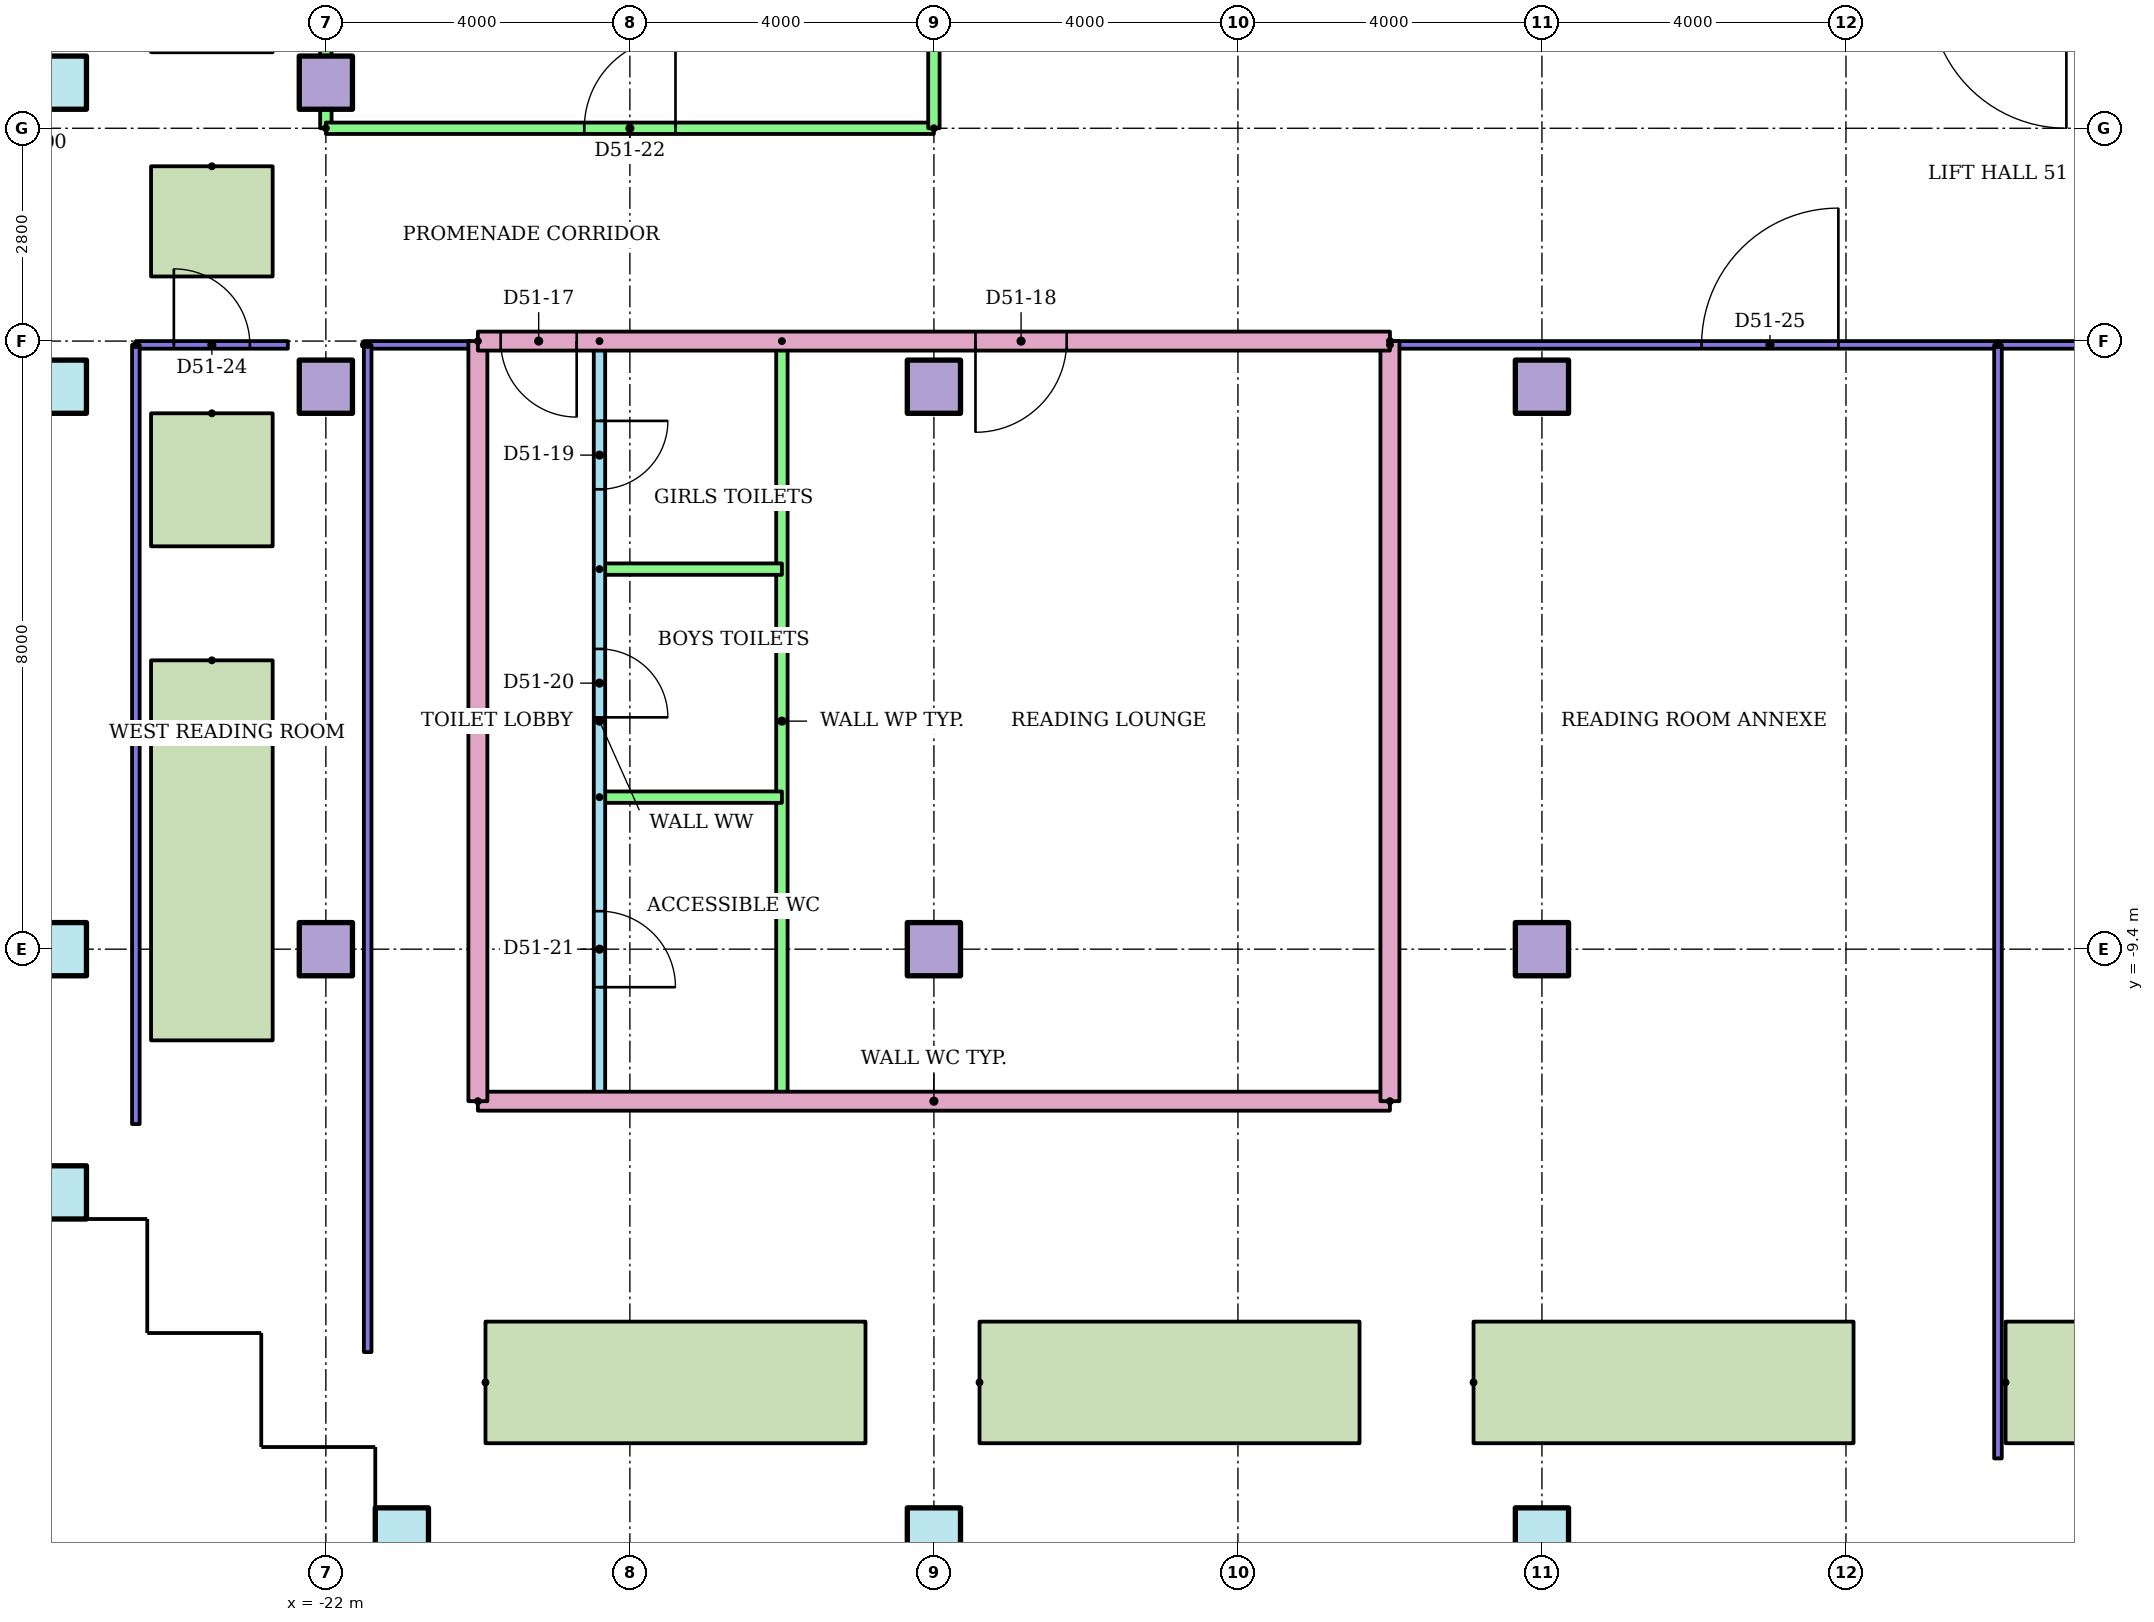
"""IFC4 building model, lengths in metres.
Left out: names, types, materials, properties, quantities, classifications, styles, units other than length and angle.
Written with IfcOpenShell. Run it as: python <this file> out.ifc"""

import sys

from ifc_helpers import new_model, si_unit, direction, frame, frame_2d, origin, origin_2d, place, context, subcontext, project, spatial, rectangle, hollow_rectangle, extrude, element, fill, save


model = new_model("IFC4")
c1 = context("Model", 3, precision=1e-05, world=origin(), true_north=direction((0.0, 1.0)))
c2 = subcontext(c1, "Body", "Model", "MODEL_VIEW")
j1 = project(units=[si_unit("LENGTHUNIT", "METRE"), si_unit("PLANEANGLEUNIT", "RADIAN")], contexts=[c1])
p1 = place(None, origin())
s1 = spatial("IfcSite", under=j1, at=p1, CompositionType="ELEMENT")
p2 = place(p1, origin())
s2 = spatial("IfcBuilding", under=s1, at=p2, CompositionType="ELEMENT")
p3 = place(p2, frame((0.0, 0.0, 194.1)))
s3 = spatial("IfcBuildingStorey", under=s2, at=p3, CompositionType="ELEMENT", Elevation=194.1)
p4 = place(p3, frame((-21.0, -17.1, 0.0)))
e1 = element("IfcColumn", 1, at=p4, inside=s3, PredefinedType="COLUMN", context=c2, shape_type="SweptSolid", body=[
    extrude(hollow_rectangle(XDim=0.7, YDim=0.7, WallThickness=0.036, at=origin_2d()), origin(), (0.0, 0.0, 1.0), 8.8),
])
for number, where in (
    (2, (-14.0, -17.1, 0.0)),
    (3, (-6.0, -17.1, 0.0)),
):
    element("IfcColumn", number, at=place(p3, frame(where)), inside=s3, PredefinedType="COLUMN", context=c2, shape_type="SweptSolid", body=[
        extrude(hollow_rectangle(XDim=0.7, YDim=0.7, WallThickness=0.036, at=origin_2d()), origin(), (0.0, 0.0, 1.0), 9.6),
    ])
for number, where in (
    (4, (-25.5, -12.6, 0.0)),
    (5, (-25.5, -9.4, 0.0)),
):
    element("IfcColumn", number, at=place(p3, frame(where)), inside=s3, PredefinedType="COLUMN", context=c2, shape_type="SweptSolid", body=[
        extrude(hollow_rectangle(XDim=0.7, YDim=0.7, WallThickness=0.036, at=origin_2d()), origin(), (0.0, 0.0, 1.0), 8.8),
    ])
for number, where in (
    (6, (-22.0, -9.4, 0.0)),
    (7, (-14.0, -9.4, 0.0)),
    (8, (-6.0, -9.4, 0.0)),
):
    element("IfcColumn", number, at=place(p3, frame(where)), inside=s3, PredefinedType="COLUMN", context=c2, shape_type="SweptSolid", body=[
        extrude(rectangle(XDim=0.7, YDim=0.7, at=origin_2d()), origin(), (0.0, 0.0, 1.0), 9.6),
    ])
p5 = place(p3, frame((-25.5, -2.0, 0.0)))
e9 = element("IfcColumn", 9, at=p5, inside=s3, PredefinedType="COLUMN", context=c2, shape_type="SweptSolid", body=[
    extrude(hollow_rectangle(XDim=0.7, YDim=0.7, WallThickness=0.036, at=origin_2d()), origin(), (0.0, 0.0, 1.0), 8.8),
])
for number, where in (
    (10, (-22.0, -2.0, 0.0)),
    (11, (-14.0, -2.0, 0.0)),
    (12, (-6.0, -2.0, 0.0)),
):
    element("IfcColumn", number, at=place(p3, frame(where)), inside=s3, PredefinedType="COLUMN", context=c2, shape_type="SweptSolid", body=[
        extrude(rectangle(XDim=0.7, YDim=0.7, at=origin_2d()), origin(), (0.0, 0.0, 1.0), 9.6),
    ])
p6 = place(p3, frame((-25.5, 2.0, 0.0)))
e13 = element("IfcColumn", 13, at=p6, inside=s3, PredefinedType="COLUMN", context=c2, shape_type="SweptSolid", body=[
    extrude(hollow_rectangle(XDim=0.7, YDim=0.7, WallThickness=0.036, at=origin_2d()), origin(), (0.0, 0.0, 1.0), 8.8),
])
p7 = place(p3, frame((-22.0, 2.0, 0.0)))
e14 = element("IfcColumn", 14, at=p7, inside=s3, PredefinedType="COLUMN", context=c2, shape_type="SweptSolid", body=[
    extrude(rectangle(XDim=0.7, YDim=0.7, at=origin_2d()), origin(), (0.0, 0.0, 1.0), 9.6),
])
p8 = place(p3, frame((-23.5, -5.6, 0.0), z_axis=(0.0, 0.0, 1.0), x_axis=(0.0, -1.0, 0.0)))
e15 = element("IfcWall", 15, at=p8, inside=s3, PredefinedType="STANDARD", context=c2, shape_type="SweptSolid", body=[
    extrude(rectangle(XDim=5.0, YDim=1.6, at=frame_2d((2.5, 0.0))), origin(), (0.0, 0.0, 1.0), 0.8),
])
for number, where in (
    (16, (-19.9, -15.1, 0.0)),
    (17, (-13.4, -15.1, 0.0)),
    (18, (-6.9, -15.1, 0.0)),
):
    element("IfcWall", number, at=place(p3, frame(where)), inside=s3, PredefinedType="STANDARD", context=c2, shape_type="SweptSolid", body=[
        extrude(rectangle(XDim=5.0, YDim=1.6, at=frame_2d((2.5, 0.0))), origin(), (0.0, 0.0, 1.0), 0.8),
    ])
p9 = place(p3, frame((-20.0, -11.4, 0.0)))
e19 = element("IfcWall", 19, at=p9, inside=s3, PredefinedType="PARTITIONING", context=c2, shape_type="SweptSolid", body=[
    extrude(rectangle(XDim=12.0, YDim=0.25, at=frame_2d((6.0, 0.0))), origin(), (0.0, 0.0, 1.0), 8.8),
])
for number, where, z_axis, x_axis in (
    (20, (-20.0, -1.4, 0.0), (0.0, 0.0, 1.0), (0.0, -1.0, 0.0)),
    (21, (-8.0, -11.4, 0.0), (0.0, 0.0, 1.0), (0.0, 1.0, 0.0)),
):
    element("IfcWall", number, at=place(p3, frame(where, z_axis=z_axis, x_axis=x_axis)), inside=s3, PredefinedType="PARTITIONING", context=c2, shape_type="SweptSolid", body=[
        extrude(rectangle(XDim=10.0, YDim=0.25, at=frame_2d((5.0, 0.0))), origin(), (0.0, 0.0, 1.0), 8.8),
    ])
p10 = place(p3, frame((-8.0, -1.4, 0.0), z_axis=(0.0, 0.0, 1.0), x_axis=(-1.0, 0.0, 0.0)))
e22 = element("IfcWall", 22, at=p10, inside=s3, PredefinedType="PARTITIONING", context=c2, shape_type="SweptSolid", body=[
    extrude(rectangle(XDim=12.0, YDim=0.25, at=frame_2d((6.0, 0.0))), origin(), (0.0, 0.0, 1.0), 8.8),
])
p11 = place(p10, frame((10.7, 0.0, 0.0)))
e23 = element("IfcOpeningElement", 23, at=p11, cuts=e22, PredefinedType="OPENING", context=c2, shape_type="SweptSolid", body=[
    extrude(rectangle(XDim=1.0, YDim=2.1, at=frame_2d((0.5, 1.05))), frame((0.0, 0.135, 0.0), z_axis=(0.0, -1.0, 0.0), x_axis=(1.0, 0.0, 0.0)), (0.0, 0.0, 1.0), 0.27),
])
p12 = place(p10, frame((4.253, 0.0, 0.0)))
e24 = element("IfcOpeningElement", 24, at=p12, cuts=e22, PredefinedType="OPENING", context=c2, shape_type="SweptSolid", body=[
    extrude(rectangle(XDim=1.2, YDim=2.1, at=frame_2d((0.6, 1.05))), frame((0.0, 0.135, 0.0), z_axis=(0.0, -1.0, 0.0), x_axis=(1.0, 0.0, 0.0)), (0.0, 0.0, 1.0), 0.27),
])
p13 = place(p3, frame((-18.4, -1.4, 0.0), z_axis=(0.0, 0.0, 1.0), x_axis=(0.0, -1.0, 0.0)))
e25 = element("IfcWall", 25, at=p13, inside=s3, PredefinedType="PARTITIONING", context=c2, shape_type="SweptSolid", body=[
    extrude(rectangle(XDim=10.0, YDim=0.15, at=frame_2d((5.0, 0.0))), origin(), (0.0, 0.0, 1.0), 8.8),
])
p14 = place(p13, frame((1.05, 0.0, 0.0)))
e26 = element("IfcOpeningElement", 26, at=p14, cuts=e25, PredefinedType="OPENING", context=c2, shape_type="SweptSolid", body=[
    extrude(rectangle(XDim=0.9, YDim=2.1, at=frame_2d((0.45, 1.05))), frame((0.0, 0.085, 0.0), z_axis=(0.0, -1.0, 0.0), x_axis=(1.0, 0.0, 0.0)), (0.0, 0.0, 1.0), 0.17),
])
p15 = place(p13, frame((4.05, 0.0, 0.0)))
e27 = element("IfcOpeningElement", 27, at=p15, cuts=e25, PredefinedType="OPENING", context=c2, shape_type="SweptSolid", body=[
    extrude(rectangle(XDim=0.9, YDim=2.1, at=frame_2d((0.45, 1.05))), frame((0.0, 0.085, 0.0), z_axis=(0.0, -1.0, 0.0), x_axis=(1.0, 0.0, 0.0)), (0.0, 0.0, 1.0), 0.17),
])
p16 = place(p13, frame((7.5, 0.0, 0.0)))
e28 = element("IfcOpeningElement", 28, at=p16, cuts=e25, PredefinedType="OPENING", context=c2, shape_type="SweptSolid", body=[
    extrude(rectangle(XDim=1.0, YDim=2.1, at=frame_2d((0.5, 1.05))), frame((0.0, 0.085, 0.0), z_axis=(0.0, -1.0, 0.0), x_axis=(1.0, 0.0, 0.0)), (0.0, 0.0, 1.0), 0.17),
])
p17 = place(p3, frame((-16.0, -1.4, 0.0), z_axis=(0.0, 0.0, 1.0), x_axis=(0.0, -1.0, 0.0)))
e29 = element("IfcWall", 29, at=p17, inside=s3, PredefinedType="PARTITIONING", context=c2, shape_type="SweptSolid", body=[
    extrude(rectangle(XDim=10.0, YDim=0.15, at=frame_2d((5.0, 0.0))), origin(), (0.0, 0.0, 1.0), 8.8),
])
for number, where in (
    (30, (-18.4, -4.4, 0.0)),
    (31, (-18.4, -7.4, 0.0)),
):
    element("IfcWall", number, at=place(p3, frame(where)), inside=s3, PredefinedType="PARTITIONING", context=c2, shape_type="SweptSolid", body=[
        extrude(rectangle(XDim=2.4, YDim=0.15, at=frame_2d((1.2, 0.0))), origin(), (0.0, 0.0, 1.0), 8.8),
    ])
p18 = place(p3, frame((-22.0, 10.4, 0.0), z_axis=(0.0, 0.0, 1.0), x_axis=(0.0, -1.0, 0.0)))
e32 = element("IfcWall", 32, at=p18, inside=s3, PredefinedType="PARTITIONING", context=c2, shape_type="SweptSolid", body=[
    extrude(rectangle(XDim=9.0, YDim=0.15, at=frame_2d((4.5, 0.0))), origin(), (0.0, 0.0, 1.0), 8.8),
])
p19 = place(p3, frame((-22.0, 1.4, 0.0)))
e33 = element("IfcWall", 33, at=p19, inside=s3, PredefinedType="PARTITIONING", context=c2, shape_type="SweptSolid", body=[
    extrude(rectangle(XDim=8.0, YDim=0.15, at=frame_2d((4.0, 0.0))), origin(), (0.0, 0.0, 1.0), 8.8),
])
p20 = place(p19, frame((3.4, 0.0, 0.0)))
e34 = element("IfcOpeningElement", 34, at=p20, cuts=e33, PredefinedType="OPENING", context=c2, shape_type="SweptSolid", body=[
    extrude(rectangle(XDim=1.2, YDim=2.1, at=frame_2d((0.6, 1.05))), frame((0.0, 0.085, 0.0), z_axis=(0.0, -1.0, 0.0), x_axis=(1.0, 0.0, 0.0)), (0.0, 0.0, 1.0), 0.17),
])
p21 = place(p3, frame((-14.0, 1.4, 0.0), z_axis=(0.0, 0.0, 1.0), x_axis=(0.0, 1.0, 0.0)))
e35 = element("IfcWall", 35, at=p21, inside=s3, PredefinedType="PARTITIONING", context=c2, shape_type="SweptSolid", body=[
    extrude(rectangle(XDim=1.6, YDim=0.15, at=frame_2d((0.8, 0.0))), origin(), (0.0, 0.0, 1.0), 8.8),
])
p22 = place(p3, frame((-24.5, -1.45, 0.0)))
e36 = element("IfcWall", 36, at=p22, inside=s3, PredefinedType="PARTITIONING", context=c2, shape_type="SweptSolid", body=[
    extrude(rectangle(XDim=2.0, YDim=0.1, at=frame_2d((1.0, 0.0))), origin(), (0.0, 0.0, 1.0), 8.8),
])
p23 = place(p22, frame((0.5, 0.0, 0.0)))
e37 = element("IfcOpeningElement", 37, at=p23, cuts=e36, PredefinedType="OPENING", context=c2, shape_type="SweptSolid", body=[
    extrude(rectangle(XDim=1.0, YDim=2.1, at=frame_2d((0.5, 1.05))), frame((0.0, 0.06, 0.0), z_axis=(0.0, -1.0, 0.0), x_axis=(1.0, 0.0, 0.0)), (0.0, 0.0, 1.0), 0.12),
])
p24 = place(p3, frame((-21.5, -1.45, 0.0)))
e38 = element("IfcWall", 38, at=p24, inside=s3, PredefinedType="PARTITIONING", context=c2, shape_type="SweptSolid", body=[
    extrude(rectangle(XDim=1.4, YDim=0.1, at=frame_2d((0.7, 0.0))), origin(), (0.0, 0.0, 1.0), 8.8),
])
p25 = place(p3, frame((-8.0, -1.45, 0.0)))
e39 = element("IfcWall", 39, at=p25, inside=s3, PredefinedType="PARTITIONING", context=c2, shape_type="SweptSolid", body=[
    extrude(rectangle(XDim=8.0, YDim=0.1, at=frame_2d((4.0, 0.0))), origin(), (0.0, 0.0, 1.0), 8.8),
])
p26 = place(p25, frame((4.1, 0.0, 0.0)))
e40 = element("IfcOpeningElement", 40, at=p26, cuts=e39, PredefinedType="OPENING", context=c2, shape_type="SweptSolid", body=[
    extrude(rectangle(XDim=1.8, YDim=2.1, at=frame_2d((0.9, 1.05))), frame((0.0, 0.06, 0.0), z_axis=(0.0, -1.0, 0.0), x_axis=(1.0, 0.0, 0.0)), (0.0, 0.0, 1.0), 0.12),
])
p27 = place(p3, frame((0.0, -1.45, 0.0)))
e41 = element("IfcWall", 41, at=p27, inside=s3, PredefinedType="PARTITIONING", context=c2, shape_type="SweptSolid", body=[
    extrude(rectangle(XDim=22.0, YDim=0.1, at=frame_2d((11.0, 0.0))), origin(), (0.0, 0.0, 1.0), 8.8),
])
p28 = place(p27, frame((5.1, 0.0, 0.0)))
e42 = element("IfcOpeningElement", 42, at=p28, cuts=e41, PredefinedType="OPENING", context=c2, shape_type="SweptSolid", body=[
    extrude(rectangle(XDim=1.8, YDim=2.1, at=frame_2d((0.9, 1.05))), frame((0.0, 0.06, 0.0), z_axis=(0.0, -1.0, 0.0), x_axis=(1.0, 0.0, 0.0)), (0.0, 0.0, 1.0), 0.12),
])
p29 = place(p27, frame((13.1, 0.0, 0.0)))
e43 = element("IfcOpeningElement", 43, at=p29, cuts=e41, PredefinedType="OPENING", context=c2, shape_type="SweptSolid", body=[
    extrude(rectangle(XDim=1.8, YDim=2.1, at=frame_2d((0.9, 1.05))), frame((0.0, 0.06, 0.0), z_axis=(0.0, -1.0, 0.0), x_axis=(1.0, 0.0, 0.0)), (0.0, 0.0, 1.0), 0.12),
])
p30 = place(p3, frame((0.0, -1.45, 0.0), z_axis=(0.0, 0.0, 1.0), x_axis=(0.0, -1.0, 0.0)))
e44 = element("IfcWall", 44, at=p30, inside=s3, PredefinedType="PARTITIONING", context=c2, shape_type="SweptSolid", body=[
    extrude(rectangle(XDim=14.65, YDim=0.1, at=frame_2d((7.325, 0.0))), origin(), (0.0, 0.0, 1.0), 8.8),
])
p31 = place(p3, frame((-21.45, -1.45, 0.0), z_axis=(0.0, 0.0, 1.0), x_axis=(0.0, -1.0, 0.0)))
e45 = element("IfcWall", 45, at=p31, inside=s3, PredefinedType="PARTITIONING", context=c2, shape_type="SweptSolid", body=[
    extrude(rectangle(XDim=13.251, YDim=0.1, at=frame_2d((6.625, 0.0))), origin(), (0.0, 0.0, 1.0), 8.8),
])
p32 = place(p3, frame((-24.5, -1.45, 0.0), z_axis=(0.0, 0.0, 1.0), x_axis=(0.0, -1.0, 0.0)))
e46 = element("IfcWall", 46, at=p32, inside=s3, PredefinedType="PARTITIONING", context=c2, shape_type="SweptSolid", body=[
    extrude(rectangle(XDim=10.251, YDim=0.1, at=frame_2d((5.125, 0.0))), origin(), (0.0, 0.0, 1.0), 8.8),
])
p33 = place(p3, frame((-23.5, 0.9, 0.0), z_axis=(0.0, 0.0, 1.0), x_axis=(0.0, -1.0, 0.0)))
e47 = element("IfcWall", 47, at=p33, inside=s3, PredefinedType="STANDARD", context=c2, shape_type="SweptSolid", body=[
    extrude(rectangle(XDim=1.45, YDim=1.6, at=frame_2d((0.725, 0.0))), origin(), (0.0, 0.0, 1.0), 0.8),
])
p34 = place(p3, frame((-23.5, -2.35, 0.0), z_axis=(0.0, 0.0, 1.0), x_axis=(0.0, -1.0, 0.0)))
e48 = element("IfcWall", 48, at=p34, inside=s3, PredefinedType="STANDARD", context=c2, shape_type="SweptSolid", body=[
    extrude(rectangle(XDim=1.75, YDim=1.6, at=frame_2d((0.875, 0.0))), origin(), (0.0, 0.0, 1.0), 0.8),
])
p35 = place(p3, frame((0.1, -15.1, 0.0)))
e49 = element("IfcWall", 49, at=p35, inside=s3, PredefinedType="STANDARD", context=c2, shape_type="SweptSolid", body=[
    extrude(rectangle(XDim=4.5, YDim=1.6, at=frame_2d((2.25, 0.0))), origin(), (0.0, 0.0, 1.0), 0.8),
])
p36 = place(p11, origin())
e50 = element("IfcDoor", 50, at=p36, inside=s3, OperationType="SINGLE_SWING_LEFT", PredefinedType="DOOR", context=c2, shape_type="SweptSolid", body=[
    extrude(rectangle(XDim=1.0, YDim=2.1, at=frame_2d((0.5, 1.05))), frame((0.0, 0.025, 0.0), z_axis=(0.0, -1.0, 0.0), x_axis=(1.0, 0.0, 0.0)), (0.0, 0.0, 1.0), 0.05),
])
fill(e23, e50)
p37 = place(p12, origin())
e51 = element("IfcDoor", 51, at=p37, inside=s3, OperationType="SINGLE_SWING_RIGHT", PredefinedType="DOOR", context=c2, shape_type="SweptSolid", body=[
    extrude(rectangle(XDim=1.2, YDim=2.1, at=frame_2d((0.6, 1.05))), frame((0.0, 0.025, 0.0), z_axis=(0.0, -1.0, 0.0), x_axis=(1.0, 0.0, 0.0)), (0.0, 0.0, 1.0), 0.05),
])
fill(e24, e51)
p38 = place(p14, origin())
e52 = element("IfcDoor", 52, at=p38, inside=s3, OperationType="SINGLE_SWING_LEFT", PredefinedType="DOOR", context=c2, shape_type="SweptSolid", body=[
    extrude(rectangle(XDim=0.9, YDim=2.1, at=frame_2d((0.45, 1.05))), frame((0.0, 0.025, 0.0), z_axis=(0.0, -1.0, 0.0), x_axis=(1.0, 0.0, 0.0)), (0.0, 0.0, 1.0), 0.05),
])
fill(e26, e52)
p39 = place(p15, origin())
e53 = element("IfcDoor", 53, at=p39, inside=s3, OperationType="SINGLE_SWING_RIGHT", PredefinedType="DOOR", context=c2, shape_type="SweptSolid", body=[
    extrude(rectangle(XDim=0.9, YDim=2.1, at=frame_2d((0.45, 1.05))), frame((0.0, 0.025, 0.0), z_axis=(0.0, -1.0, 0.0), x_axis=(1.0, 0.0, 0.0)), (0.0, 0.0, 1.0), 0.05),
])
fill(e27, e53)
p40 = place(p16, origin())
e54 = element("IfcDoor", 54, at=p40, inside=s3, OperationType="SINGLE_SWING_RIGHT", PredefinedType="DOOR", context=c2, shape_type="SweptSolid", body=[
    extrude(rectangle(XDim=1.0, YDim=2.1, at=frame_2d((0.5, 1.05))), frame((0.0, 0.025, 0.0), z_axis=(0.0, -1.0, 0.0), x_axis=(1.0, 0.0, 0.0)), (0.0, 0.0, 1.0), 0.05),
])
fill(e28, e54)
p41 = place(p20, origin())
e55 = element("IfcDoor", 55, at=p41, inside=s3, OperationType="SINGLE_SWING_RIGHT", PredefinedType="DOOR", context=c2, shape_type="SweptSolid", body=[
    extrude(rectangle(XDim=1.2, YDim=2.1, at=frame_2d((0.6, 1.05))), frame((0.0, 0.025, 0.0), z_axis=(0.0, -1.0, 0.0), x_axis=(1.0, 0.0, 0.0)), (0.0, 0.0, 1.0), 0.05),
])
fill(e34, e55)
p42 = place(p23, origin())
e56 = element("IfcDoor", 56, at=p42, inside=s3, OperationType="SINGLE_SWING_LEFT", PredefinedType="DOOR", context=c2, shape_type="SweptSolid", body=[
    extrude(rectangle(XDim=1.0, YDim=2.1, at=frame_2d((0.5, 1.05))), frame((0.0, 0.025, 0.0), z_axis=(0.0, -1.0, 0.0), x_axis=(1.0, 0.0, 0.0)), (0.0, 0.0, 1.0), 0.05),
])
fill(e37, e56)
p43 = place(p26, origin())
e57 = element("IfcDoor", 57, at=p43, inside=s3, OperationType="DOUBLE_DOOR_SINGLE_SWING", PredefinedType="DOOR", context=c2, shape_type="SweptSolid", body=[
    extrude(rectangle(XDim=1.8, YDim=2.1, at=frame_2d((0.9, 1.05))), frame((0.0, 0.025, 0.0), z_axis=(0.0, -1.0, 0.0), x_axis=(1.0, 0.0, 0.0)), (0.0, 0.0, 1.0), 0.05),
])
fill(e40, e57)
save(model, sys.argv[1])
